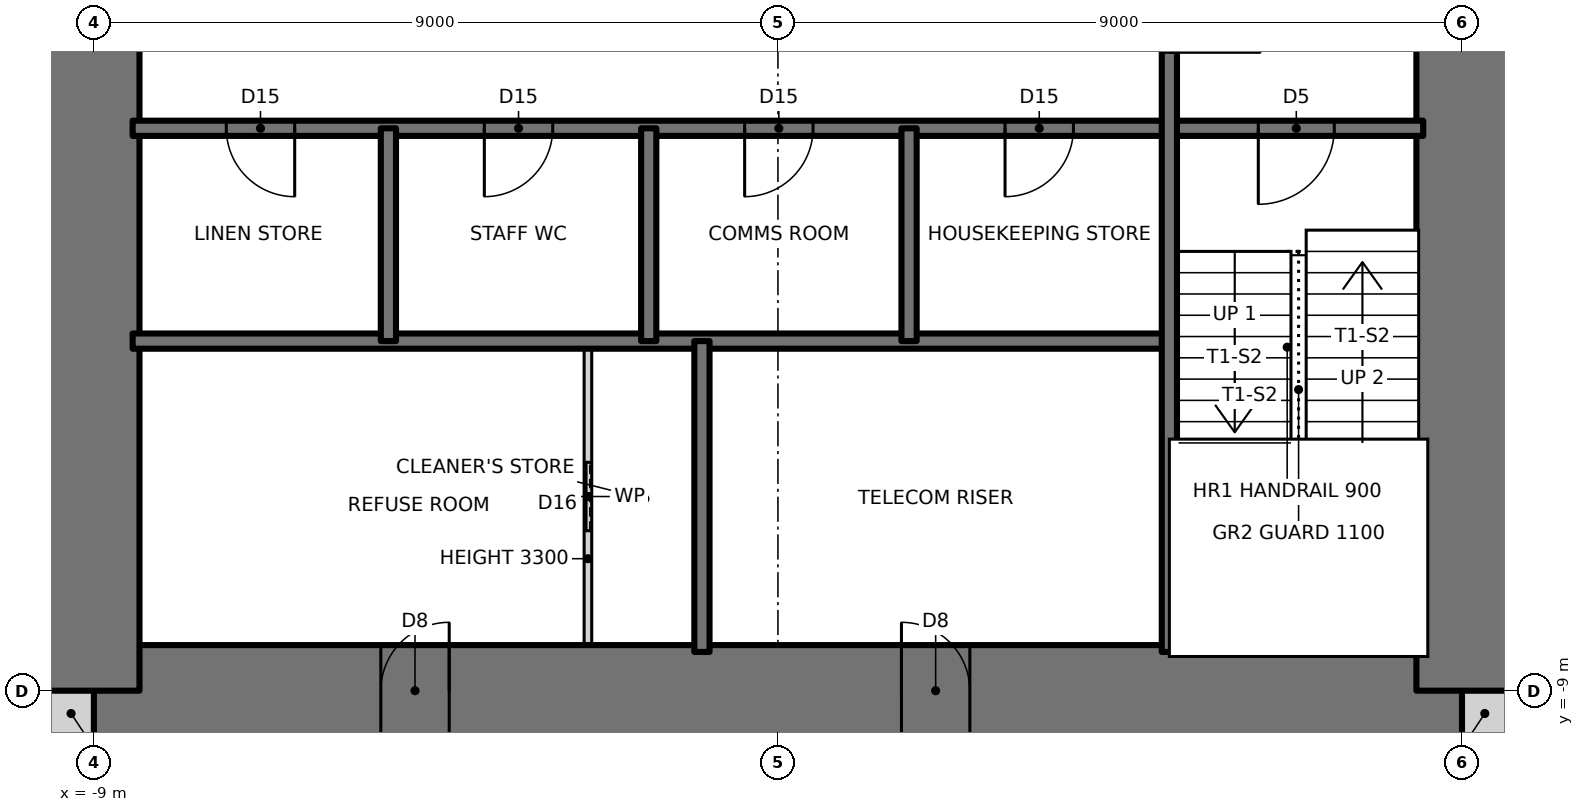
"""IFC4 building model, lengths in metres.
Left out: names, types, materials, properties, quantities, classifications, styles, units other than length and angle.
Written with IfcOpenShell. Run it as: python <this file> out.ifc"""

import sys

from ifc_helpers import new_model, si_unit, direction, frame, frame_2d, origin, place, context, subcontext, project, spatial, rectangle, extrude, element, fill, save


model = new_model("IFC4")
c1 = context("Model", 3, precision=1e-05, world=origin(), true_north=direction((0.0, 1.0)))
c2 = subcontext(c1, "Body", "Model", "MODEL_VIEW")
j1 = project(units=[si_unit("LENGTHUNIT", "METRE"), si_unit("PLANEANGLEUNIT", "RADIAN")], contexts=[c1])
p1 = place(None, origin())
s1 = spatial("IfcSite", under=j1, at=p1, CompositionType="ELEMENT")
p2 = place(p1, origin())
s2 = spatial("IfcBuilding", under=s1, at=p2, CompositionType="ELEMENT")
p3 = place(p2, frame((0.0, 0.0, 222.0)))
s3 = spatial("IfcBuildingStorey", under=s2, at=p3, CompositionType="ELEMENT", Elevation=222.0)
for number, where, z_axis, x_axis in (
    (1, (-9.6, -9.3, 0.0), (0.0, 0.0, 1.0), (1.0, 0.0, 0.0)),
    (2, (9.0, -9.3, 0.0), (0.0, 0.0, 1.0), (1.0, 0.0, 0.0)),
):
    element("IfcWall", number, at=place(p3, frame(where, z_axis=z_axis, x_axis=x_axis)), inside=s3, PredefinedType="SOLIDWALL", context=c2, shape_type="SweptSolid", body=[
        extrude(rectangle(XDim=0.6, YDim=0.6, at=frame_2d((0.3, 0.0))), origin(), (0.0, 0.0, 1.0), 3.5),
    ])
p4 = place(p3, frame((-9.0, -9.0, 0.0), z_axis=(0.0, 0.0, 1.0), x_axis=(1.0, 0.0, 0.0)))
e3 = element("IfcWall", 3, at=p4, inside=s3, PredefinedType="SHEAR", context=c2, shape_type="SweptSolid", body=[
    extrude(rectangle(XDim=18.0, YDim=1.2, at=frame_2d((9.0, 0.0))), origin(), (0.0, 0.0, 1.0), 3.5),
])
p5 = place(p4, frame((3.775, 0.0, 0.0)))
e4 = element("IfcOpeningElement", 4, at=p5, cuts=e3, PredefinedType="OPENING", context=c2, shape_type="SweptSolid", body=[
    extrude(rectangle(XDim=0.9, YDim=2.1, at=frame_2d((0.45, 1.05))), frame((0.0, 0.61, 0.0), z_axis=(0.0, -1.0, 0.0), x_axis=(1.0, 0.0, 0.0)), (0.0, 0.0, 1.0), 1.22),
])
p6 = place(p4, frame((10.625, 0.0, 0.0)))
e5 = element("IfcOpeningElement", 5, at=p6, cuts=e3, PredefinedType="OPENING", context=c2, shape_type="SweptSolid", body=[
    extrude(rectangle(XDim=0.9, YDim=2.1, at=frame_2d((0.45, 1.05))), frame((0.0, 0.61, 0.0), z_axis=(0.0, -1.0, 0.0), x_axis=(1.0, 0.0, 0.0)), (0.0, 0.0, 1.0), 1.22),
])
p7 = place(p3, frame((9.0, -9.0, 0.0), z_axis=(0.0, 0.0, 1.0), x_axis=(0.0, 1.0, 0.0)))
e6 = element("IfcWall", 6, at=p7, inside=s3, PredefinedType="SHEAR", context=c2, shape_type="SweptSolid", body=[
    extrude(rectangle(XDim=18.0, YDim=1.2, at=frame_2d((9.0, 0.0))), origin(), (0.0, 0.0, 1.0), 3.5),
])
p8 = place(p7, frame((8.5, 0.0, 0.0)))
e7 = element("IfcOpeningElement", 7, at=p8, cuts=e6, PredefinedType="OPENING", context=c2, shape_type="SweptSolid", body=[
    extrude(rectangle(XDim=1.0, YDim=2.1, at=frame_2d((0.5, 1.05))), frame((0.0, 0.61, 0.0), z_axis=(0.0, -1.0, 0.0), x_axis=(1.0, 0.0, 0.0)), (0.0, 0.0, 1.0), 1.22),
])
p9 = place(p3, frame((-9.0, 9.0, 0.0), z_axis=(0.0, 0.0, 1.0), x_axis=(0.0, -1.0, 0.0)))
e8 = element("IfcWall", 8, at=p9, inside=s3, PredefinedType="SHEAR", context=c2, shape_type="SweptSolid", body=[
    extrude(rectangle(XDim=18.0, YDim=1.2, at=frame_2d((9.0, 0.0))), origin(), (0.0, 0.0, 1.0), 3.5),
])
p10 = place(p9, frame((8.5, 0.0, 0.0)))
e9 = element("IfcOpeningElement", 9, at=p10, cuts=e8, PredefinedType="OPENING", context=c2, shape_type="SweptSolid", body=[
    extrude(rectangle(XDim=1.0, YDim=2.1, at=frame_2d((0.5, 1.05))), frame((0.0, 0.61, 0.0), z_axis=(0.0, -1.0, 0.0), x_axis=(1.0, 0.0, 0.0)), (0.0, 0.0, 1.0), 1.22),
])
p11 = place(p3, frame((-8.49, -4.4, 0.0), z_axis=(0.0, 0.0, 1.0), x_axis=(1.0, 0.0, 0.0)))
e10 = element("IfcWall", 10, at=p11, inside=s3, PredefinedType="SOLIDWALL", context=c2, shape_type="SweptSolid", body=[
    extrude(rectangle(XDim=13.64, YDim=0.2, at=frame_2d((6.82, 0.0))), origin(), (0.0, 0.0, 1.0), 3.5),
])
p12 = place(p3, frame((-8.49, -1.6, 0.0), z_axis=(0.0, 0.0, 1.0), x_axis=(1.0, 0.0, 0.0)))
e11 = element("IfcWall", 11, at=p12, inside=s3, PredefinedType="SOLIDWALL", context=c2, shape_type="SweptSolid", body=[
    extrude(rectangle(XDim=16.98, YDim=0.2, at=frame_2d((8.49, 0.0))), origin(), (0.0, 0.0, 1.0), 3.5),
])
p13 = place(p12, frame((14.81, 0.0, 0.0)))
e12 = element("IfcOpeningElement", 12, at=p13, cuts=e11, PredefinedType="OPENING", context=c2, shape_type="SweptSolid", body=[
    extrude(rectangle(XDim=1.0, YDim=2.1, at=frame_2d((0.5, 1.05))), frame((0.0, 0.11, 0.0), z_axis=(0.0, -1.0, 0.0), x_axis=(1.0, 0.0, 0.0)), (0.0, 0.0, 1.0), 0.22),
])
p14 = place(p12, frame((1.232, 0.0, 0.0)))
e13 = element("IfcOpeningElement", 13, at=p14, cuts=e11, PredefinedType="OPENING", context=c2, shape_type="SweptSolid", body=[
    extrude(rectangle(XDim=0.9, YDim=2.1, at=frame_2d((0.45, 1.05))), frame((0.0, 0.11, 0.0), z_axis=(0.0, -1.0, 0.0), x_axis=(1.0, 0.0, 0.0)), (0.0, 0.0, 1.0), 0.22),
])
p15 = place(p12, frame((4.627, 0.0, 0.0)))
e14 = element("IfcOpeningElement", 14, at=p15, cuts=e11, PredefinedType="OPENING", context=c2, shape_type="SweptSolid", body=[
    extrude(rectangle(XDim=0.9, YDim=2.1, at=frame_2d((0.45, 1.05))), frame((0.0, 0.11, 0.0), z_axis=(0.0, -1.0, 0.0), x_axis=(1.0, 0.0, 0.0)), (0.0, 0.0, 1.0), 0.22),
])
p16 = place(p12, frame((8.052, 0.0, 0.0)))
e15 = element("IfcOpeningElement", 15, at=p16, cuts=e11, PredefinedType="OPENING", context=c2, shape_type="SweptSolid", body=[
    extrude(rectangle(XDim=0.9, YDim=2.1, at=frame_2d((0.45, 1.05))), frame((0.0, 0.11, 0.0), z_axis=(0.0, -1.0, 0.0), x_axis=(1.0, 0.0, 0.0)), (0.0, 0.0, 1.0), 0.22),
])
p17 = place(p12, frame((11.478, 0.0, 0.0)))
e16 = element("IfcOpeningElement", 16, at=p17, cuts=e11, PredefinedType="OPENING", context=c2, shape_type="SweptSolid", body=[
    extrude(rectangle(XDim=0.9, YDim=2.1, at=frame_2d((0.45, 1.05))), frame((0.0, 0.11, 0.0), z_axis=(0.0, -1.0, 0.0), x_axis=(1.0, 0.0, 0.0)), (0.0, 0.0, 1.0), 0.22),
])
p18 = place(p3, frame((5.15, -8.49, 0.0), z_axis=(0.0, 0.0, 1.0), x_axis=(0.0, 1.0, 0.0)))
e17 = element("IfcWall", 17, at=p18, inside=s3, PredefinedType="SOLIDWALL", context=c2, shape_type="SweptSolid", body=[
    extrude(rectangle(XDim=13.09, YDim=0.2, at=frame_2d((6.545, 0.0))), origin(), (0.0, 0.0, 1.0), 3.5),
])
p19 = place(p18, frame((7.89, 0.0, 0.0)))
e18 = element("IfcOpeningElement", 18, at=p19, cuts=e17, PredefinedType="OPENING", context=c2, shape_type="SweptSolid", body=[
    extrude(rectangle(XDim=1.2, YDim=2.1, at=frame_2d((0.6, 1.05))), frame((0.0, 0.11, 0.0), z_axis=(0.0, -1.0, 0.0), x_axis=(1.0, 0.0, 0.0)), (0.0, 0.0, 1.0), 0.22),
])
p20 = place(p3, frame((1.725, -4.4, 0.0), z_axis=(0.0, 0.0, 1.0), x_axis=(0.0, 1.0, 0.0)))
e19 = element("IfcWall", 19, at=p20, inside=s3, PredefinedType="SOLIDWALL", context=c2, shape_type="SweptSolid", body=[
    extrude(rectangle(XDim=2.8, YDim=0.2, at=frame_2d((1.4, 0.0))), origin(), (0.0, 0.0, 1.0), 3.5),
])
p21 = place(p3, frame((-1.0, -8.49, 0.0), z_axis=(0.0, 0.0, 1.0), x_axis=(0.0, 1.0, 0.0)))
e20 = element("IfcWall", 20, at=p21, inside=s3, PredefinedType="SOLIDWALL", context=c2, shape_type="SweptSolid", body=[
    extrude(rectangle(XDim=4.09, YDim=0.2, at=frame_2d((2.045, 0.0))), origin(), (0.0, 0.0, 1.0), 3.5),
])
p22 = place(p3, frame((-1.7, -4.4, 0.0), z_axis=(0.0, 0.0, 1.0), x_axis=(0.0, 1.0, 0.0)))
e21 = element("IfcWall", 21, at=p22, inside=s3, PredefinedType="SOLIDWALL", context=c2, shape_type="SweptSolid", body=[
    extrude(rectangle(XDim=2.8, YDim=0.2, at=frame_2d((1.4, 0.0))), origin(), (0.0, 0.0, 1.0), 3.5),
])
p23 = place(p3, frame((-2.5, -8.49, 0.0), z_axis=(0.0, 0.0, 1.0), x_axis=(0.0, 1.0, 0.0)))
e22 = element("IfcWall", 22, at=p23, inside=s3, PredefinedType="PARTITIONING", context=c2, shape_type="SweptSolid", body=[
    extrude(rectangle(XDim=4.09, YDim=0.1, at=frame_2d((2.045, 0.0))), origin(), (0.0, 0.0, 1.0), 3.3),
])
p24 = place(p23, frame((1.595, 0.0, 0.0)))
e23 = element("IfcOpeningElement", 23, at=p24, cuts=e22, PredefinedType="OPENING", context=c2, shape_type="SweptSolid", body=[
    extrude(rectangle(XDim=0.9, YDim=2.1, at=frame_2d((0.45, 1.05))), frame((0.0, 0.06, 0.0), z_axis=(0.0, -1.0, 0.0), x_axis=(1.0, 0.0, 0.0)), (0.0, 0.0, 1.0), 0.12),
])
p25 = place(p3, frame((-5.125, -4.4, 0.0), z_axis=(0.0, 0.0, 1.0), x_axis=(0.0, 1.0, 0.0)))
e24 = element("IfcWall", 24, at=p25, inside=s3, PredefinedType="SOLIDWALL", context=c2, shape_type="SweptSolid", body=[
    extrude(rectangle(XDim=2.8, YDim=0.2, at=frame_2d((1.4, 0.0))), origin(), (0.0, 0.0, 1.0), 3.5),
])
p26 = place(p13, frame((1.0, 0.0, 0.0), z_axis=(0.0, 0.0, 1.0), x_axis=(-1.0, 0.0, 0.0)))
e25 = element("IfcDoor", 25, at=p26, inside=s3, OperationType="SINGLE_SWING_RIGHT", PredefinedType="DOOR", context=c2, shape_type="SweptSolid", body=[
    extrude(rectangle(XDim=1.0, YDim=2.1, at=frame_2d((0.5, 1.05))), frame((0.0, 0.025, 0.0), z_axis=(0.0, -1.0, 0.0), x_axis=(1.0, 0.0, 0.0)), (0.0, 0.0, 1.0), 0.05),
])
fill(e12, e25)
p27 = place(p19, frame((1.2, 0.0, 0.0), z_axis=(0.0, 0.0, 1.0), x_axis=(-1.0, 0.0, 0.0)))
e26 = element("IfcDoor", 26, at=p27, inside=s3, OperationType="SINGLE_SWING_RIGHT", PredefinedType="DOOR", context=c2, shape_type="SweptSolid", body=[
    extrude(rectangle(XDim=1.2, YDim=2.1, at=frame_2d((0.6, 1.05))), frame((0.0, 0.025, 0.0), z_axis=(0.0, -1.0, 0.0), x_axis=(1.0, 0.0, 0.0)), (0.0, 0.0, 1.0), 0.05),
])
fill(e18, e26)
p28 = place(p14, frame((0.9, 0.0, 0.0), z_axis=(0.0, 0.0, 1.0), x_axis=(-1.0, 0.0, 0.0)))
e27 = element("IfcDoor", 27, at=p28, inside=s3, OperationType="SINGLE_SWING_LEFT", PredefinedType="DOOR", context=c2, shape_type="SweptSolid", body=[
    extrude(rectangle(XDim=0.9, YDim=2.1, at=frame_2d((0.45, 1.05))), frame((0.0, 0.025, 0.0), z_axis=(0.0, -1.0, 0.0), x_axis=(1.0, 0.0, 0.0)), (0.0, 0.0, 1.0), 0.05),
])
fill(e13, e27)
p29 = place(p15, frame((0.9, 0.0, 0.0), z_axis=(0.0, 0.0, 1.0), x_axis=(-1.0, 0.0, 0.0)))
e28 = element("IfcDoor", 28, at=p29, inside=s3, OperationType="SINGLE_SWING_RIGHT", PredefinedType="DOOR", context=c2, shape_type="SweptSolid", body=[
    extrude(rectangle(XDim=0.9, YDim=2.1, at=frame_2d((0.45, 1.05))), frame((0.0, 0.025, 0.0), z_axis=(0.0, -1.0, 0.0), x_axis=(1.0, 0.0, 0.0)), (0.0, 0.0, 1.0), 0.05),
])
fill(e14, e28)
p30 = place(p16, frame((0.9, 0.0, 0.0), z_axis=(0.0, 0.0, 1.0), x_axis=(-1.0, 0.0, 0.0)))
e29 = element("IfcDoor", 29, at=p30, inside=s3, OperationType="SINGLE_SWING_RIGHT", PredefinedType="DOOR", context=c2, shape_type="SweptSolid", body=[
    extrude(rectangle(XDim=0.9, YDim=2.1, at=frame_2d((0.45, 1.05))), frame((0.0, 0.025, 0.0), z_axis=(0.0, -1.0, 0.0), x_axis=(1.0, 0.0, 0.0)), (0.0, 0.0, 1.0), 0.05),
])
fill(e15, e29)
p31 = place(p17, frame((0.9, 0.0, 0.0), z_axis=(0.0, 0.0, 1.0), x_axis=(-1.0, 0.0, 0.0)))
e30 = element("IfcDoor", 30, at=p31, inside=s3, OperationType="SINGLE_SWING_RIGHT", PredefinedType="DOOR", context=c2, shape_type="SweptSolid", body=[
    extrude(rectangle(XDim=0.9, YDim=2.1, at=frame_2d((0.45, 1.05))), frame((0.0, 0.025, 0.0), z_axis=(0.0, -1.0, 0.0), x_axis=(1.0, 0.0, 0.0)), (0.0, 0.0, 1.0), 0.05),
])
fill(e16, e30)
p32 = place(p24, origin())
e31 = element("IfcDoor", 31, at=p32, inside=s3, OperationType="SLIDING_TO_LEFT", PredefinedType="DOOR", context=c2, shape_type="SweptSolid", body=[
    extrude(rectangle(XDim=0.9, YDim=2.1, at=frame_2d((0.45, 1.05))), frame((0.0, 0.025, 0.0), z_axis=(0.0, -1.0, 0.0), x_axis=(1.0, 0.0, 0.0)), (0.0, 0.0, 1.0), 0.05),
])
fill(e23, e31)
p33 = place(p5, origin())
e32 = element("IfcDoor", 32, at=p33, inside=s3, OperationType="SINGLE_SWING_RIGHT", PredefinedType="DOOR", context=c2, shape_type="SweptSolid", body=[
    extrude(rectangle(XDim=0.9, YDim=2.1, at=frame_2d((0.45, 1.05))), frame((0.0, 0.025, 0.0), z_axis=(0.0, -1.0, 0.0), x_axis=(1.0, 0.0, 0.0)), (0.0, 0.0, 1.0), 0.05),
])
fill(e4, e32)
p34 = place(p6, origin())
e33 = element("IfcDoor", 33, at=p34, inside=s3, OperationType="SINGLE_SWING_LEFT", PredefinedType="DOOR", context=c2, shape_type="SweptSolid", body=[
    extrude(rectangle(XDim=0.9, YDim=2.1, at=frame_2d((0.45, 1.05))), frame((0.0, 0.025, 0.0), z_axis=(0.0, -1.0, 0.0), x_axis=(1.0, 0.0, 0.0)), (0.0, 0.0, 1.0), 0.05),
])
fill(e5, e33)
save(model, sys.argv[1])
